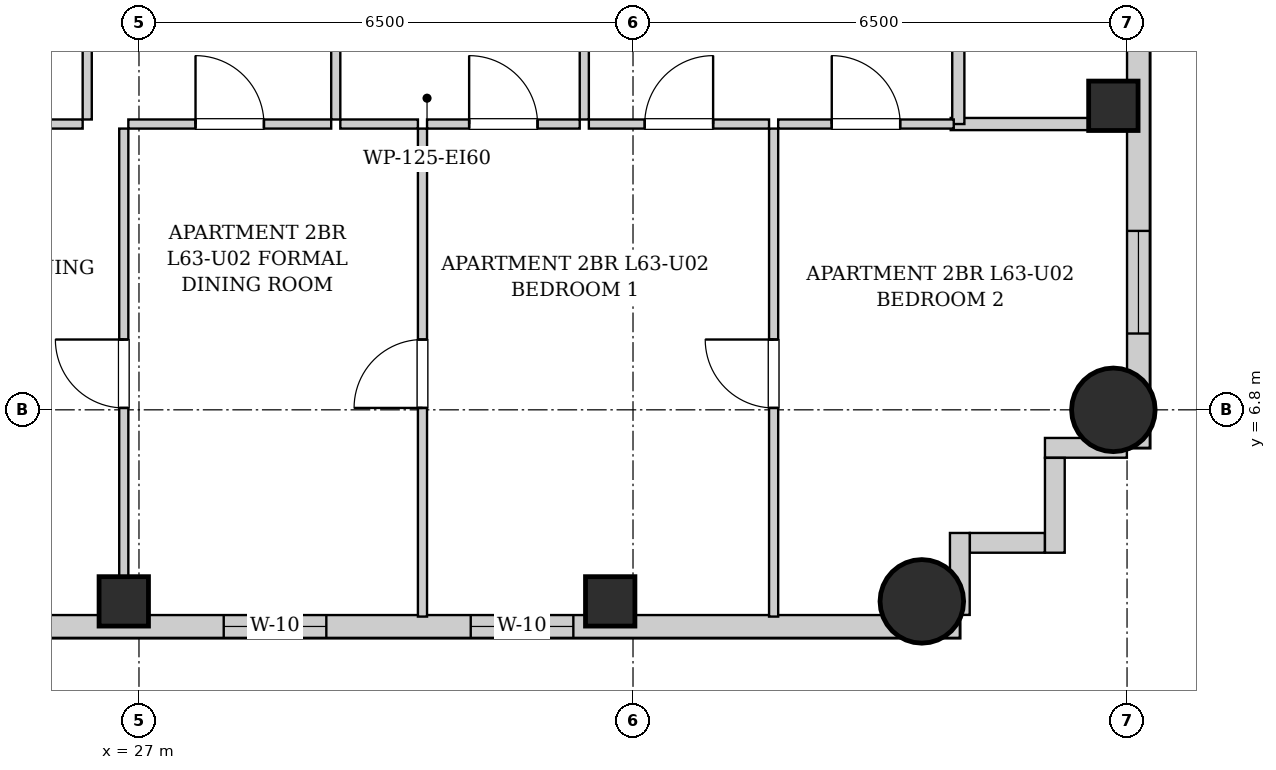
"""IFC4 building model, lengths in metres.
Left out: names, types, materials, properties, quantities, classifications, styles, units other than length and angle.
Written with IfcOpenShell. Run it as: python <this file> out.ifc"""

import sys

from ifc_helpers import new_model, si_unit, direction, frame, frame_2d, origin, origin_2d, place, context, subcontext, project, spatial, rectangle, circle, extrude, element, fill, save


model = new_model("IFC4")
c1 = context("Model", 3, precision=1e-05, world=origin(), true_north=direction((0.0, 1.0)))
c2 = subcontext(c1, "Body", "Model", "MODEL_VIEW")
j1 = project(units=[si_unit("LENGTHUNIT", "METRE"), si_unit("PLANEANGLEUNIT", "RADIAN")], contexts=[c1])
p1 = place(None, origin())
s1 = spatial("IfcSite", under=j1, at=p1, CompositionType="ELEMENT")
p2 = place(p1, origin())
s2 = spatial("IfcBuilding", under=s1, at=p2, CompositionType="ELEMENT")
p3 = place(p2, frame((0.0, 0.0, 217.3)))
s3 = spatial("IfcBuildingStorey", under=s2, at=p3, CompositionType="ELEMENT", Elevation=217.3)
for number, where, z_axis, x_axis in (
    (1, (26.8, 4.28, 0.0), (0.0, 0.0, 1.0), (1.0, 0.0, 0.0)),
    (2, (33.2, 4.28, 0.0), (0.0, 0.0, 1.0), (1.0, 0.0, 0.0)),
):
    element("IfcColumn", number, at=place(p3, frame(where, z_axis=z_axis, x_axis=x_axis)), inside=s3, PredefinedType="COLUMN", context=c2, shape_type="SweptSolid", body=[
        extrude(rectangle(XDim=0.65, YDim=0.65, at=origin_2d()), origin(), (0.0, 0.0, 1.0), 3.4),
    ])
for number, where, z_axis, x_axis in (
    (3, (37.3, 4.28, 0.0), (0.0, 0.0, 1.0), (1.0, 0.0, 0.0)),
    (4, (39.82, 6.8, 0.0), (0.0, 0.0, 1.0), (1.0, 0.0, 0.0)),
):
    element("IfcColumn", number, at=place(p3, frame(where, z_axis=z_axis, x_axis=x_axis)), inside=s3, PredefinedType="COLUMN", context=c2, shape_type="SweptSolid", body=[
        extrude(circle(Radius=0.55, at=origin_2d()), origin(), (0.0, 0.0, 1.0), 3.4),
    ])
p4 = place(p3, frame((39.82, 10.8, 0.0), z_axis=(0.0, 0.0, 1.0), x_axis=(1.0, 0.0, 0.0)))
e5 = element("IfcColumn", 5, at=p4, inside=s3, PredefinedType="COLUMN", context=c2, shape_type="SweptSolid", body=[
    extrude(rectangle(XDim=0.65, YDim=0.65, at=origin_2d()), origin(), (0.0, 0.0, 1.0), 3.4),
])
p5 = place(p3, frame((40.15, 37.7, 0.0), z_axis=(0.0, 0.0, 1.0), x_axis=(0.0, -1.0, 0.0)))
e6 = element("IfcWall", 6, at=p5, inside=s3, PredefinedType="SOLIDWALL", context=c2, shape_type="SweptSolid", body=[
    extrude(rectangle(XDim=31.4, YDim=0.3, at=frame_2d((15.7, 0.0))), origin(), (0.0, 0.0, 1.0), 3.14),
])
p6 = place(p5, frame((28.546, 0.0, 0.55)))
e7 = element("IfcOpeningElement", 7, at=p6, cuts=e6, PredefinedType="OPENING", context=c2, shape_type="SweptSolid", body=[
    extrude(rectangle(XDim=1.35, YDim=1.2, at=frame_2d((0.675, 0.6))), frame((0.0, 0.16, 0.0), z_axis=(0.0, -1.0, 0.0), x_axis=(1.0, 0.0, 0.0)), (0.0, 0.0, 1.0), 0.32),
])
p7 = place(p5, frame((1.504, 0.0, 0.55)))
e8 = element("IfcOpeningElement", 8, at=p7, cuts=e6, PredefinedType="OPENING", context=c2, shape_type="SweptSolid", body=[
    extrude(rectangle(XDim=1.35, YDim=1.2, at=frame_2d((0.675, 0.6))), frame((0.0, 0.16, 0.0), z_axis=(0.0, -1.0, 0.0), x_axis=(1.0, 0.0, 0.0)), (0.0, 0.0, 1.0), 0.32),
])
p8 = place(p5, frame((18.2, 0.0, 0.55)))
e9 = element("IfcOpeningElement", 9, at=p8, cuts=e6, PredefinedType="OPENING", context=c2, shape_type="SweptSolid", body=[
    extrude(rectangle(XDim=1.35, YDim=1.2, at=frame_2d((0.675, 0.6))), frame((0.0, 0.16, 0.0), z_axis=(0.0, -1.0, 0.0), x_axis=(1.0, 0.0, 0.0)), (0.0, 0.0, 1.0), 0.32),
])
p9 = place(p5, frame((19.81, 0.0, 0.55)))
e10 = element("IfcOpeningElement", 10, at=p9, cuts=e6, PredefinedType="OPENING", context=c2, shape_type="SweptSolid", body=[
    extrude(rectangle(XDim=1.35, YDim=1.2, at=frame_2d((0.675, 0.6))), frame((0.0, 0.16, 0.0), z_axis=(0.0, -1.0, 0.0), x_axis=(1.0, 0.0, 0.0)), (0.0, 0.0, 1.0), 0.32),
])
p10 = place(p5, frame((11.043, 0.0, 0.55)))
e11 = element("IfcOpeningElement", 11, at=p10, cuts=e6, PredefinedType="OPENING", context=c2, shape_type="SweptSolid", body=[
    extrude(rectangle(XDim=1.35, YDim=1.2, at=frame_2d((0.675, 0.6))), frame((0.0, 0.16, 0.0), z_axis=(0.0, -1.0, 0.0), x_axis=(1.0, 0.0, 0.0)), (0.0, 0.0, 1.0), 0.32),
])
p11 = place(p5, frame((9.185, 0.0, 0.55)))
e12 = element("IfcOpeningElement", 12, at=p11, cuts=e6, PredefinedType="OPENING", context=c2, shape_type="SweptSolid", body=[
    extrude(rectangle(XDim=1.35, YDim=1.2, at=frame_2d((0.675, 0.6))), frame((0.0, 0.16, 0.0), z_axis=(0.0, -1.0, 0.0), x_axis=(1.0, 0.0, 0.0)), (0.0, 0.0, 1.0), 0.32),
])
p12 = place(p3, frame((37.8, 3.95, 0.0), z_axis=(0.0, 0.0, 1.0), x_axis=(-1.0, 0.0, 0.0)))
e13 = element("IfcWall", 13, at=p12, inside=s3, PredefinedType="SOLIDWALL", context=c2, shape_type="SweptSolid", body=[
    extrude(rectangle(XDim=15.75, YDim=0.3, at=frame_2d((7.875, 0.0))), origin(), (0.0, 0.0, 1.0), 3.14),
])
p13 = place(p12, frame((8.335, 0.0, 0.55)))
e14 = element("IfcOpeningElement", 14, at=p13, cuts=e13, PredefinedType="OPENING", context=c2, shape_type="SweptSolid", body=[
    extrude(rectangle(XDim=1.35, YDim=1.2, at=frame_2d((0.675, 0.6))), frame((0.0, 0.16, 0.0), z_axis=(0.0, -1.0, 0.0), x_axis=(1.0, 0.0, 0.0)), (0.0, 0.0, 1.0), 0.32),
])
p14 = place(p12, frame((5.085, 0.0, 0.55)))
e15 = element("IfcOpeningElement", 15, at=p14, cuts=e13, PredefinedType="OPENING", context=c2, shape_type="SweptSolid", body=[
    extrude(rectangle(XDim=1.35, YDim=1.2, at=frame_2d((0.675, 0.6))), frame((0.0, 0.16, 0.0), z_axis=(0.0, -1.0, 0.0), x_axis=(1.0, 0.0, 0.0)), (0.0, 0.0, 1.0), 0.32),
])
p15 = place(p3, frame((39.998, 6.3, 0.0), z_axis=(0.0, 0.0, 1.0), x_axis=(-1.0, 0.0, 0.0)))
e16 = element("IfcWall", 16, at=p15, inside=s3, PredefinedType="SOLIDWALL", context=c2, shape_type="SweptSolid", body=[
    extrude(rectangle(XDim=1.078, YDim=0.26, at=frame_2d((0.539, 0.0))), origin(), (0.0, 0.0, 1.0), 3.14),
])
p16 = place(p3, frame((39.05, 6.168, 0.0), z_axis=(0.0, 0.0, 1.0), x_axis=(0.0, -1.0, 0.0)))
e17 = element("IfcWall", 17, at=p16, inside=s3, PredefinedType="SOLIDWALL", context=c2, shape_type="SweptSolid", body=[
    extrude(rectangle(XDim=1.248, YDim=0.26, at=frame_2d((0.624, 0.0))), origin(), (0.0, 0.0, 1.0), 3.14),
])
p17 = place(p3, frame((38.918, 5.05, 0.0), z_axis=(0.0, 0.0, 1.0), x_axis=(-1.0, 0.0, 0.0)))
e18 = element("IfcWall", 18, at=p17, inside=s3, PredefinedType="SOLIDWALL", context=c2, shape_type="SweptSolid", body=[
    extrude(rectangle(XDim=0.986, YDim=0.26, at=frame_2d((0.493, 0.0))), origin(), (0.0, 0.0, 1.0), 3.14),
])
p18 = place(p3, frame((37.8, 5.18, 0.0), z_axis=(0.0, 0.0, 1.0), x_axis=(0.0, -1.0, 0.0)))
e19 = element("IfcWall", 19, at=p18, inside=s3, PredefinedType="SOLIDWALL", context=c2, shape_type="SweptSolid", body=[
    extrude(rectangle(XDim=1.078, YDim=0.26, at=frame_2d((0.539, 0.0))), origin(), (0.0, 0.0, 1.0), 3.14),
])
p19 = place(p3, frame((37.68, 10.56, 0.0), z_axis=(0.0, 0.0, 1.0), x_axis=(1.0, 0.0, 0.0)))
e20 = element("IfcWall", 20, at=p19, inside=s3, PredefinedType="PARTITIONING", context=c2, shape_type="SweptSolid", body=[
    extrude(rectangle(XDim=2.34, YDim=0.16, at=frame_2d((1.17, 0.0))), origin(), (0.0, 0.0, 1.0), 3.14),
])
p20 = place(p3, frame((37.78, 10.56, 0.0), z_axis=(0.0, 0.0, 1.0), x_axis=(0.0, 1.0, 0.0)))
e21 = element("IfcWall", 21, at=p20, inside=s3, PredefinedType="PARTITIONING", context=c2, shape_type="SweptSolid", body=[
    extrude(rectangle(XDim=2.91, YDim=0.16, at=frame_2d((1.455, 0.0))), origin(), (0.0, 0.0, 1.0), 3.14),
])
p21 = place(p3, frame((26.319, 10.62, 0.0), z_axis=(0.0, 0.0, 1.0), x_axis=(0.0, 1.0, 0.0)))
e22 = element("IfcWall", 22, at=p21, inside=s3, PredefinedType="PARTITIONING", context=c2, shape_type="SweptSolid", body=[
    extrude(rectangle(XDim=2.85, YDim=0.12, at=frame_2d((1.425, 0.0))), origin(), (0.0, 0.0, 1.0), 3.14),
])
p22 = place(p21, frame((0.975, 0.0, 0.0)))
e23 = element("IfcOpeningElement", 23, at=p22, cuts=e22, PredefinedType="OPENING", context=c2, shape_type="SweptSolid", body=[
    extrude(rectangle(XDim=0.9, YDim=2.05, at=frame_2d((0.45, 1.025))), frame((0.0, 0.07, 0.0), z_axis=(0.0, -1.0, 0.0), x_axis=(1.0, 0.0, 0.0)), (0.0, 0.0, 1.0), 0.14),
])
p23 = place(p3, frame((21.819, 10.56, 0.0), z_axis=(0.0, 0.0, 1.0), x_axis=(1.0, 0.0, 0.0)))
e24 = element("IfcWall", 24, at=p23, inside=s3, PredefinedType="PARTITIONING", context=c2, shape_type="SweptSolid", body=[
    extrude(rectangle(XDim=4.44, YDim=0.12, at=frame_2d((2.22, 0.0))), origin(), (0.0, 0.0, 1.0), 3.14),
])
p24 = place(p23, frame((1.77, 0.0, 0.0)))
e25 = element("IfcOpeningElement", 25, at=p24, cuts=e24, PredefinedType="OPENING", context=c2, shape_type="SweptSolid", body=[
    extrude(rectangle(XDim=0.9, YDim=2.05, at=frame_2d((0.45, 1.025))), frame((0.0, 0.07, 0.0), z_axis=(0.0, -1.0, 0.0), x_axis=(1.0, 0.0, 0.0)), (0.0, 0.0, 1.0), 0.14),
])
p25 = place(p3, frame((29.589, 10.62, 0.0), z_axis=(0.0, 0.0, 1.0), x_axis=(0.0, 1.0, 0.0)))
e26 = element("IfcWall", 26, at=p25, inside=s3, PredefinedType="PARTITIONING", context=c2, shape_type="SweptSolid", body=[
    extrude(rectangle(XDim=2.85, YDim=0.12, at=frame_2d((1.425, 0.0))), origin(), (0.0, 0.0, 1.0), 3.14),
])
p26 = place(p25, frame((0.975, 0.0, 0.0)))
e27 = element("IfcOpeningElement", 27, at=p26, cuts=e26, PredefinedType="OPENING", context=c2, shape_type="SweptSolid", body=[
    extrude(rectangle(XDim=0.9, YDim=2.05, at=frame_2d((0.45, 1.025))), frame((0.0, 0.07, 0.0), z_axis=(0.0, -1.0, 0.0), x_axis=(1.0, 0.0, 0.0)), (0.0, 0.0, 1.0), 0.14),
])
p27 = place(p3, frame((26.86, 10.56, 0.0), z_axis=(0.0, 0.0, 1.0), x_axis=(1.0, 0.0, 0.0)))
e28 = element("IfcWall", 28, at=p27, inside=s3, PredefinedType="PARTITIONING", context=c2, shape_type="SweptSolid", body=[
    extrude(rectangle(XDim=2.669, YDim=0.12, at=frame_2d((1.334, 0.0))), origin(), (0.0, 0.0, 1.0), 3.14),
])
p28 = place(p27, frame((0.884, 0.0, 0.0)))
e29 = element("IfcOpeningElement", 29, at=p28, cuts=e28, PredefinedType="OPENING", context=c2, shape_type="SweptSolid", body=[
    extrude(rectangle(XDim=0.9, YDim=2.05, at=frame_2d((0.45, 1.025))), frame((0.0, 0.07, 0.0), z_axis=(0.0, -1.0, 0.0), x_axis=(1.0, 0.0, 0.0)), (0.0, 0.0, 1.0), 0.14),
])
p29 = place(p3, frame((32.859, 10.62, 0.0), z_axis=(0.0, 0.0, 1.0), x_axis=(0.0, 1.0, 0.0)))
e30 = element("IfcWall", 30, at=p29, inside=s3, PredefinedType="PARTITIONING", context=c2, shape_type="SweptSolid", body=[
    extrude(rectangle(XDim=2.85, YDim=0.12, at=frame_2d((1.425, 0.0))), origin(), (0.0, 0.0, 1.0), 3.14),
])
p30 = place(p29, frame((0.975, 0.0, 0.0)))
e31 = element("IfcOpeningElement", 31, at=p30, cuts=e30, PredefinedType="OPENING", context=c2, shape_type="SweptSolid", body=[
    extrude(rectangle(XDim=0.9, YDim=2.05, at=frame_2d((0.45, 1.025))), frame((0.0, 0.07, 0.0), z_axis=(0.0, -1.0, 0.0), x_axis=(1.0, 0.0, 0.0)), (0.0, 0.0, 1.0), 0.14),
])
p31 = place(p3, frame((29.649, 10.56, 0.0), z_axis=(0.0, 0.0, 1.0), x_axis=(1.0, 0.0, 0.0)))
e32 = element("IfcWall", 32, at=p31, inside=s3, PredefinedType="PARTITIONING", context=c2, shape_type="SweptSolid", body=[
    extrude(rectangle(XDim=1.021, YDim=0.12, at=frame_2d((0.51, 0.0))), origin(), (0.0, 0.0, 1.0), 3.14),
])
p32 = place(p3, frame((30.79, 10.56, 0.0), z_axis=(0.0, 0.0, 1.0), x_axis=(1.0, 0.0, 0.0)))
e33 = element("IfcWall", 33, at=p32, inside=s3, PredefinedType="PARTITIONING", context=c2, shape_type="SweptSolid", body=[
    extrude(rectangle(XDim=2.009, YDim=0.12, at=frame_2d((1.004, 0.0))), origin(), (0.0, 0.0, 1.0), 3.14),
])
p33 = place(p32, frame((0.554, 0.0, 0.0)))
e34 = element("IfcOpeningElement", 34, at=p33, cuts=e33, PredefinedType="OPENING", context=c2, shape_type="SweptSolid", body=[
    extrude(rectangle(XDim=0.9, YDim=2.05, at=frame_2d((0.45, 1.025))), frame((0.0, 0.07, 0.0), z_axis=(0.0, -1.0, 0.0), x_axis=(1.0, 0.0, 0.0)), (0.0, 0.0, 1.0), 0.14),
])
p34 = place(p3, frame((32.919, 10.56, 0.0), z_axis=(0.0, 0.0, 1.0), x_axis=(1.0, 0.0, 0.0)))
e35 = element("IfcWall", 35, at=p34, inside=s3, PredefinedType="PARTITIONING", context=c2, shape_type="SweptSolid", body=[
    extrude(rectangle(XDim=2.371, YDim=0.12, at=frame_2d((1.186, 0.0))), origin(), (0.0, 0.0, 1.0), 3.14),
])
p35 = place(p34, frame((0.735, 0.0, 0.0)))
e36 = element("IfcOpeningElement", 36, at=p35, cuts=e35, PredefinedType="OPENING", context=c2, shape_type="SweptSolid", body=[
    extrude(rectangle(XDim=0.9, YDim=2.05, at=frame_2d((0.45, 1.025))), frame((0.0, 0.07, 0.0), z_axis=(0.0, -1.0, 0.0), x_axis=(1.0, 0.0, 0.0)), (0.0, 0.0, 1.0), 0.14),
])
p36 = place(p3, frame((35.41, 10.56, 0.0), z_axis=(0.0, 0.0, 1.0), x_axis=(1.0, 0.0, 0.0)))
e37 = element("IfcWall", 37, at=p36, inside=s3, PredefinedType="PARTITIONING", context=c2, shape_type="SweptSolid", body=[
    extrude(rectangle(XDim=2.31, YDim=0.12, at=frame_2d((1.155, 0.0))), origin(), (0.0, 0.0, 1.0), 3.14),
])
p37 = place(p36, frame((0.705, 0.0, 0.0)))
e38 = element("IfcOpeningElement", 38, at=p37, cuts=e37, PredefinedType="OPENING", context=c2, shape_type="SweptSolid", body=[
    extrude(rectangle(XDim=0.9, YDim=2.05, at=frame_2d((0.45, 1.025))), frame((0.0, 0.07, 0.0), z_axis=(0.0, -1.0, 0.0), x_axis=(1.0, 0.0, 0.0)), (0.0, 0.0, 1.0), 0.14),
])
p38 = place(p3, frame((26.8, 4.08, 0.0), z_axis=(0.0, 0.0, 1.0), x_axis=(0.0, 1.0, 0.0)))
e39 = element("IfcWall", 39, at=p38, inside=s3, PredefinedType="PARTITIONING", context=c2, shape_type="SweptSolid", body=[
    extrude(rectangle(XDim=6.42, YDim=0.12, at=frame_2d((3.21, 0.0))), origin(), (0.0, 0.0, 1.0), 3.14),
])
p39 = place(p38, frame((2.745, 0.0, 0.0)))
e40 = element("IfcOpeningElement", 40, at=p39, cuts=e39, PredefinedType="OPENING", context=c2, shape_type="SweptSolid", body=[
    extrude(rectangle(XDim=0.9, YDim=2.05, at=frame_2d((0.45, 1.025))), frame((0.0, 0.07, 0.0), z_axis=(0.0, -1.0, 0.0), x_axis=(1.0, 0.0, 0.0)), (0.0, 0.0, 1.0), 0.14),
])
p40 = place(p3, frame((30.73, 4.08, 0.0), z_axis=(0.0, 0.0, 1.0), x_axis=(0.0, 1.0, 0.0)))
e41 = element("IfcWall", 41, at=p40, inside=s3, PredefinedType="PARTITIONING", context=c2, shape_type="SweptSolid", body=[
    extrude(rectangle(XDim=6.42, YDim=0.12, at=frame_2d((3.21, 0.0))), origin(), (0.0, 0.0, 1.0), 3.14),
])
p41 = place(p40, frame((2.745, 0.0, 0.0)))
e42 = element("IfcOpeningElement", 42, at=p41, cuts=e41, PredefinedType="OPENING", context=c2, shape_type="SweptSolid", body=[
    extrude(rectangle(XDim=0.9, YDim=2.05, at=frame_2d((0.45, 1.025))), frame((0.0, 0.07, 0.0), z_axis=(0.0, -1.0, 0.0), x_axis=(1.0, 0.0, 0.0)), (0.0, 0.0, 1.0), 0.14),
])
p42 = place(p3, frame((35.35, 4.08, 0.0), z_axis=(0.0, 0.0, 1.0), x_axis=(0.0, 1.0, 0.0)))
e43 = element("IfcWall", 43, at=p42, inside=s3, PredefinedType="PARTITIONING", context=c2, shape_type="SweptSolid", body=[
    extrude(rectangle(XDim=6.42, YDim=0.12, at=frame_2d((3.21, 0.0))), origin(), (0.0, 0.0, 1.0), 3.14),
])
p43 = place(p42, frame((2.745, 0.0, 0.0)))
e44 = element("IfcOpeningElement", 44, at=p43, cuts=e43, PredefinedType="OPENING", context=c2, shape_type="SweptSolid", body=[
    extrude(rectangle(XDim=0.9, YDim=2.05, at=frame_2d((0.45, 1.025))), frame((0.0, 0.07, 0.0), z_axis=(0.0, -1.0, 0.0), x_axis=(1.0, 0.0, 0.0)), (0.0, 0.0, 1.0), 0.14),
])
p44 = place(p28, origin())
e45 = element("IfcDoor", 45, at=p44, inside=s3, OperationType="SINGLE_SWING_LEFT", PredefinedType="DOOR", context=c2, shape_type="SweptSolid", body=[
    extrude(rectangle(XDim=0.9, YDim=2.05, at=frame_2d((0.45, 1.025))), frame((0.0, 0.025, 0.0), z_axis=(0.0, -1.0, 0.0), x_axis=(1.0, 0.0, 0.0)), (0.0, 0.0, 1.0), 0.05),
])
fill(e29, e45)
p45 = place(p33, origin())
e46 = element("IfcDoor", 46, at=p45, inside=s3, OperationType="SINGLE_SWING_LEFT", PredefinedType="DOOR", context=c2, shape_type="SweptSolid", body=[
    extrude(rectangle(XDim=0.9, YDim=2.05, at=frame_2d((0.45, 1.025))), frame((0.0, 0.025, 0.0), z_axis=(0.0, -1.0, 0.0), x_axis=(1.0, 0.0, 0.0)), (0.0, 0.0, 1.0), 0.05),
])
fill(e34, e46)
p46 = place(p35, origin())
e47 = element("IfcDoor", 47, at=p46, inside=s3, OperationType="SINGLE_SWING_RIGHT", PredefinedType="DOOR", context=c2, shape_type="SweptSolid", body=[
    extrude(rectangle(XDim=0.9, YDim=2.05, at=frame_2d((0.45, 1.025))), frame((0.0, 0.025, 0.0), z_axis=(0.0, -1.0, 0.0), x_axis=(1.0, 0.0, 0.0)), (0.0, 0.0, 1.0), 0.05),
])
fill(e36, e47)
p47 = place(p37, origin())
e48 = element("IfcDoor", 48, at=p47, inside=s3, OperationType="SINGLE_SWING_LEFT", PredefinedType="DOOR", context=c2, shape_type="SweptSolid", body=[
    extrude(rectangle(XDim=0.9, YDim=2.05, at=frame_2d((0.45, 1.025))), frame((0.0, 0.025, 0.0), z_axis=(0.0, -1.0, 0.0), x_axis=(1.0, 0.0, 0.0)), (0.0, 0.0, 1.0), 0.05),
])
fill(e38, e48)
p48 = place(p39, origin())
e49 = element("IfcDoor", 49, at=p48, inside=s3, OperationType="SINGLE_SWING_RIGHT", PredefinedType="DOOR", context=c2, shape_type="SweptSolid", body=[
    extrude(rectangle(XDim=0.9, YDim=2.05, at=frame_2d((0.45, 1.025))), frame((0.0, 0.025, 0.0), z_axis=(0.0, -1.0, 0.0), x_axis=(1.0, 0.0, 0.0)), (0.0, 0.0, 1.0), 0.05),
])
fill(e40, e49)
p49 = place(p41, origin())
e50 = element("IfcDoor", 50, at=p49, inside=s3, OperationType="SINGLE_SWING_LEFT", PredefinedType="DOOR", context=c2, shape_type="SweptSolid", body=[
    extrude(rectangle(XDim=0.9, YDim=2.05, at=frame_2d((0.45, 1.025))), frame((0.0, 0.025, 0.0), z_axis=(0.0, -1.0, 0.0), x_axis=(1.0, 0.0, 0.0)), (0.0, 0.0, 1.0), 0.05),
])
fill(e42, e50)
p50 = place(p43, origin())
e51 = element("IfcDoor", 51, at=p50, inside=s3, OperationType="SINGLE_SWING_RIGHT", PredefinedType="DOOR", context=c2, shape_type="SweptSolid", body=[
    extrude(rectangle(XDim=0.9, YDim=2.05, at=frame_2d((0.45, 1.025))), frame((0.0, 0.025, 0.0), z_axis=(0.0, -1.0, 0.0), x_axis=(1.0, 0.0, 0.0)), (0.0, 0.0, 1.0), 0.05),
])
fill(e44, e51)
p51 = place(p13, origin())
e52 = element("IfcWindow", 52, at=p51, inside=s3, PartitioningType="SINGLE_PANEL", PredefinedType="WINDOW", context=c2, shape_type="SweptSolid", body=[
    extrude(rectangle(XDim=1.35, YDim=1.2, at=frame_2d((0.675, 0.6))), frame((0.0, 0.03, 0.0), z_axis=(0.0, -1.0, 0.0), x_axis=(1.0, 0.0, 0.0)), (0.0, 0.0, 1.0), 0.06),
])
fill(e14, e52)
p52 = place(p14, origin())
e53 = element("IfcWindow", 53, at=p52, inside=s3, PartitioningType="SINGLE_PANEL", PredefinedType="WINDOW", context=c2, shape_type="SweptSolid", body=[
    extrude(rectangle(XDim=1.35, YDim=1.2, at=frame_2d((0.675, 0.6))), frame((0.0, 0.03, 0.0), z_axis=(0.0, -1.0, 0.0), x_axis=(1.0, 0.0, 0.0)), (0.0, 0.0, 1.0), 0.06),
])
fill(e15, e53)
p53 = place(p6, origin())
e54 = element("IfcWindow", 54, at=p53, inside=s3, PartitioningType="SINGLE_PANEL", PredefinedType="WINDOW", context=c2, shape_type="SweptSolid", body=[
    extrude(rectangle(XDim=1.35, YDim=1.2, at=frame_2d((0.675, 0.6))), frame((0.0, 0.03, 0.0), z_axis=(0.0, -1.0, 0.0), x_axis=(1.0, 0.0, 0.0)), (0.0, 0.0, 1.0), 0.06),
])
fill(e7, e54)
save(model, sys.argv[1])
